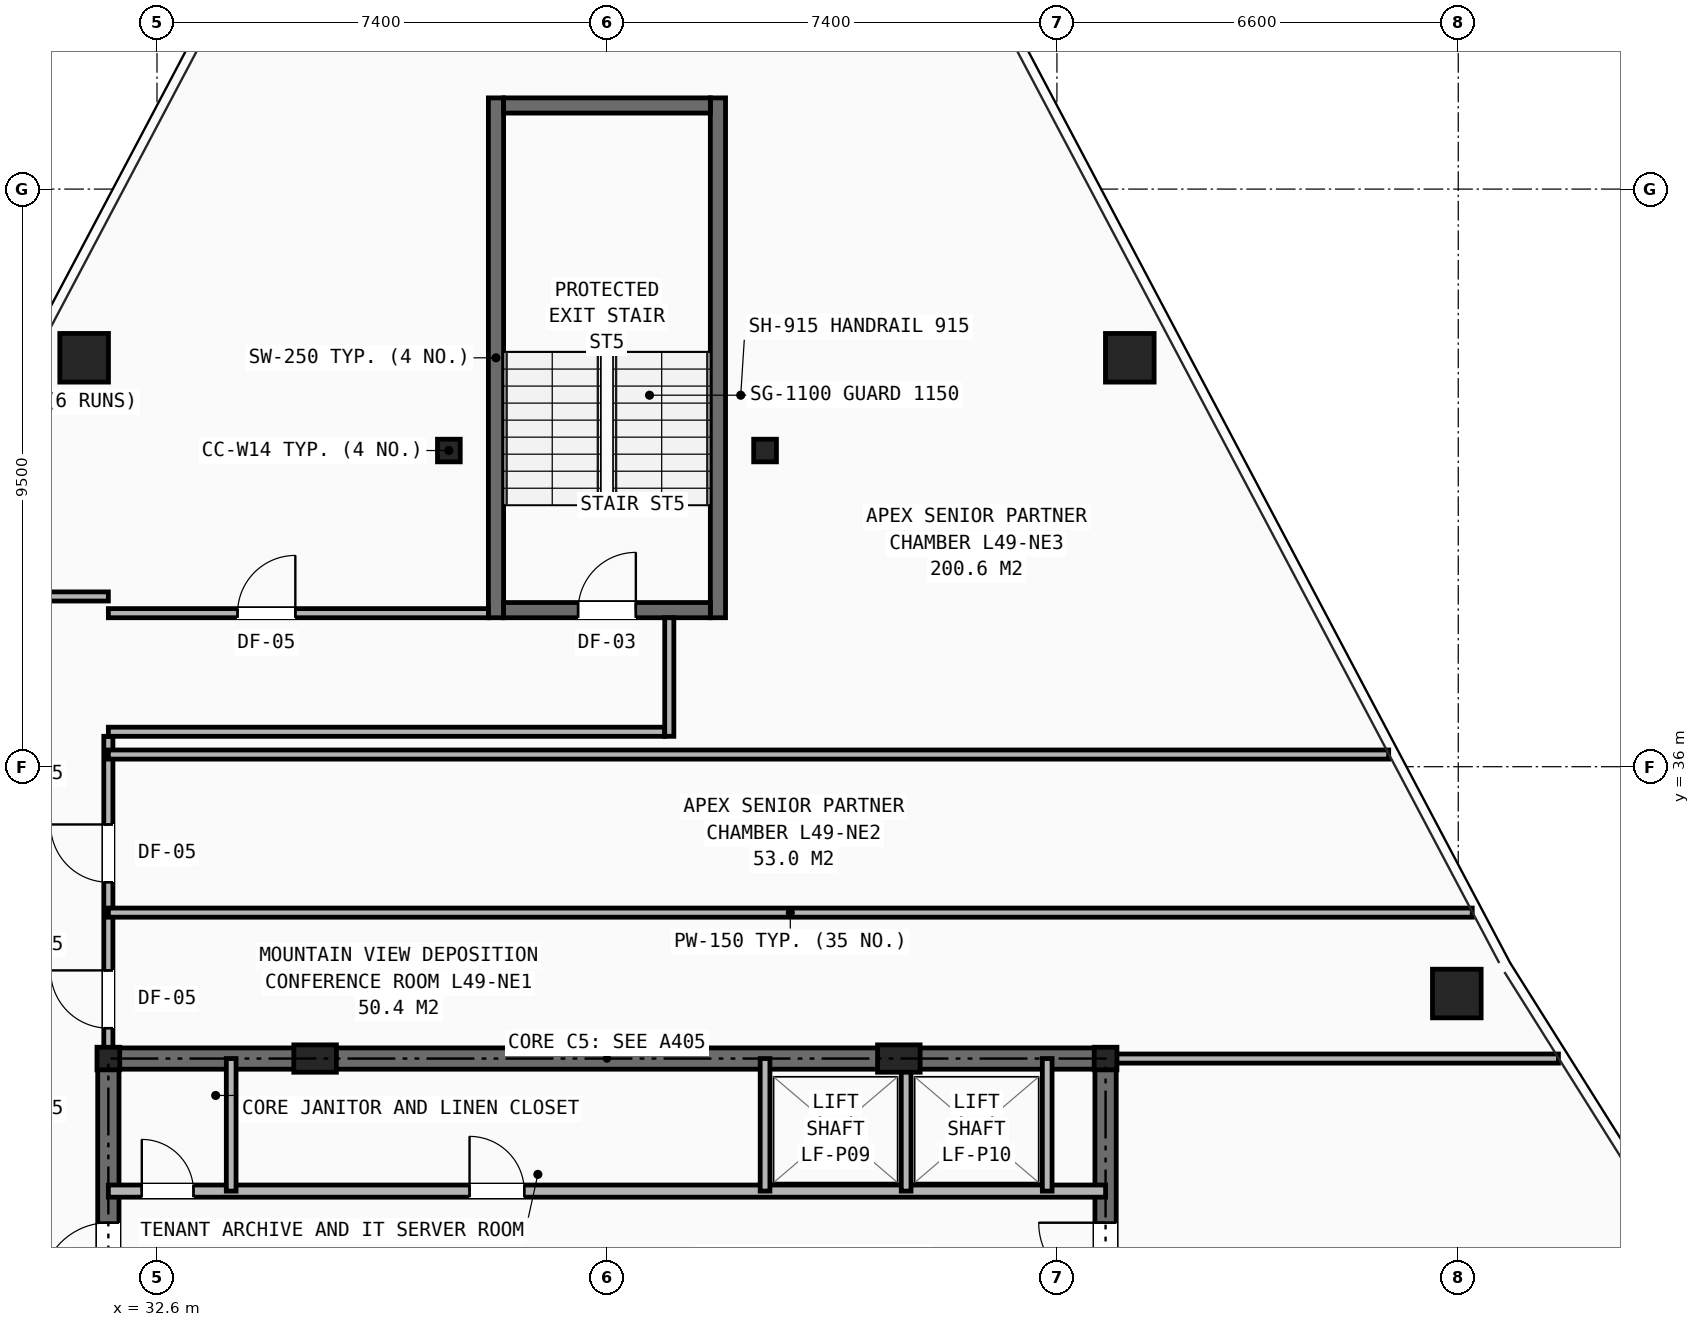
"""IFC4 building model, lengths in metres.
Left out: names, types, materials, properties, quantities, classifications, styles, units other than length and angle.
Written with IfcOpenShell. Run it as: python <this file> out.ifc"""

import sys

from ifc_helpers import new_model, si_unit, direction, frame, frame_2d, origin, origin_2d, place, context, subcontext, project, spatial, rectangle, hollow_rectangle, i_section, extrude, element, fill, save


model = new_model("IFC4")
c1 = context("Model", 3, precision=1e-05, world=origin(), true_north=direction((0.0, 1.0)))
c2 = subcontext(c1, "Body", "Model", "MODEL_VIEW")
j1 = project(units=[si_unit("LENGTHUNIT", "METRE"), si_unit("PLANEANGLEUNIT", "RADIAN")], contexts=[c1])
p1 = place(None, origin())
s1 = spatial("IfcSite", under=j1, at=p1, CompositionType="ELEMENT")
p2 = place(p1, origin())
s2 = spatial("IfcBuilding", under=s1, at=p2, CompositionType="ELEMENT")
p3 = place(p2, frame((0.0, 0.0, 172.35)))
s3 = spatial("IfcBuildingStorey", under=s2, at=p3, CompositionType="ELEMENT", Elevation=172.35)
for number, where, z_axis, x_axis in (
    (1, (31.8, 31.2, 0.0), (0.0, 0.0, 1.0), (1.0, 0.0, 0.0)),
    (2, (48.2, 31.2, 0.0), (0.0, 0.0, 1.0), (1.0, 0.0, 0.0)),
    (3, (37.4, 41.2, 0.0), (0.0, 0.0, 1.0), (1.0, 0.0, 0.0)),
    (4, (42.6, 41.2, 0.0), (0.0, 0.0, 1.0), (1.0, 0.0, 0.0)),
):
    element("IfcColumn", number, at=place(p3, frame(where, z_axis=z_axis, x_axis=x_axis)), inside=s3, PredefinedType="COLUMN", context=c2, shape_type="SweptSolid", body=[
        extrude(i_section(OverallWidth=0.374, OverallDepth=0.372, WebThickness=0.016, FlangeThickness=0.026, at=origin_2d()), origin(), (0.0, 0.0, 1.0), 3.45),
    ])
for number, where, z_axis, x_axis in (
    (5, (35.2, 31.2, 0.0), (0.0, 0.0, 1.0), (1.0, 0.0, 0.0)),
    (6, (44.8, 31.2, 0.0), (0.0, 0.0, 1.0), (1.0, 0.0, 0.0)),
):
    element("IfcColumn", number, at=place(p3, frame(where, z_axis=z_axis, x_axis=x_axis)), inside=s3, PredefinedType="PILASTER", context=c2, shape_type="SweptSolid", body=[
        extrude(rectangle(XDim=0.7, YDim=0.45, at=origin_2d()), origin(), (0.0, 0.0, 1.0), 3.45),
    ])
for number, where, z_axis, x_axis in (
    (7, (31.402, 42.726, 0.0), (0.0, 0.0, 1.0), (1.0, 0.0, 0.0)),
    (8, (53.976, 32.269, 0.0), (0.0, 0.0, 1.0), (1.0, 0.0, 0.0)),
    (9, (48.598, 42.726, 0.0), (0.0, 0.0, 1.0), (1.0, 0.0, 0.0)),
):
    element("IfcColumn", number, at=place(p3, frame(where, z_axis=z_axis, x_axis=x_axis)), inside=s3, PredefinedType="COLUMN", context=c2, shape_type="SweptSolid", body=[
        extrude(hollow_rectangle(XDim=0.8, YDim=0.8, WallThickness=0.055, at=origin_2d()), origin(), (0.0, 0.0, 1.0), 3.45),
    ])
p4 = place(p3, frame((31.8, 31.2, 0.0), z_axis=(0.0, 0.0, 1.0), x_axis=(1.0, 0.0, 0.0)))
e10 = element("IfcWall", 10, at=p4, inside=s3, PredefinedType="SHEAR", context=c2, shape_type="SweptSolid", body=[
    extrude(rectangle(XDim=16.4, YDim=0.35, at=frame_2d((8.2, 0.0))), origin(), (0.0, 0.0, 1.0), 3.21),
])
p5 = place(p3, frame((31.8, 16.4, 0.0), z_axis=(0.0, 0.0, 1.0), x_axis=(0.0, 1.0, 0.0)))
e11 = element("IfcWall", 11, at=p5, inside=s3, PredefinedType="SHEAR", context=c2, shape_type="SweptSolid", body=[
    extrude(rectangle(XDim=14.8, YDim=0.35, at=frame_2d((7.4, 0.0))), origin(), (0.0, 0.0, 1.0), 3.21),
])
p6 = place(p5, frame((11.0, 0.0, 0.0)))
e12 = element("IfcOpeningElement", 12, at=p6, cuts=e11, PredefinedType="OPENING", context=c2, shape_type="SweptSolid", body=[
    extrude(rectangle(XDim=1.1, YDim=2.15, at=frame_2d((0.55, 1.075))), frame((0.0, 0.185, 0.0), z_axis=(0.0, -1.0, 0.0), x_axis=(1.0, 0.0, 0.0)), (0.0, 0.0, 1.0), 0.37),
])
p7 = place(p3, frame((48.2, 16.4, 0.0), z_axis=(0.0, 0.0, 1.0), x_axis=(0.0, 1.0, 0.0)))
e13 = element("IfcWall", 13, at=p7, inside=s3, PredefinedType="SHEAR", context=c2, shape_type="SweptSolid", body=[
    extrude(rectangle(XDim=14.8, YDim=0.35, at=frame_2d((7.4, 0.0))), origin(), (0.0, 0.0, 1.0), 3.21),
])
p8 = place(p7, frame((11.0, 0.0, 0.0)))
e14 = element("IfcOpeningElement", 14, at=p8, cuts=e13, PredefinedType="OPENING", context=c2, shape_type="SweptSolid", body=[
    extrude(rectangle(XDim=1.1, YDim=2.15, at=frame_2d((0.55, 1.075))), frame((0.0, 0.185, 0.0), z_axis=(0.0, -1.0, 0.0), x_axis=(1.0, 0.0, 0.0)), (0.0, 0.0, 1.0), 0.37),
])
p9 = place(p3, frame((31.8, 29.02, 0.0), z_axis=(0.0, 0.0, 1.0), x_axis=(1.0, 0.0, 0.0)))
e15 = element("IfcWall", 15, at=p9, inside=s3, PredefinedType="SOLIDWALL", context=c2, shape_type="SweptSolid", body=[
    extrude(rectangle(XDim=16.4, YDim=0.2, at=frame_2d((8.2, 0.0))), origin(), (0.0, 0.0, 1.0), 2.665),
])
p10 = place(p9, frame((0.55, 0.0, 0.0)))
e16 = element("IfcOpeningElement", 16, at=p10, cuts=e15, PredefinedType="OPENING", context=c2, shape_type="SweptSolid", body=[
    extrude(rectangle(XDim=0.85, YDim=2.05, at=frame_2d((0.425, 1.025))), frame((0.0, 0.11, 0.0), z_axis=(0.0, -1.0, 0.0), x_axis=(1.0, 0.0, 0.0)), (0.0, 0.0, 1.0), 0.22),
])
p11 = place(p9, frame((5.94, 0.0, 0.0)))
e17 = element("IfcOpeningElement", 17, at=p11, cuts=e15, PredefinedType="OPENING", context=c2, shape_type="SweptSolid", body=[
    extrude(rectangle(XDim=0.9, YDim=2.1, at=frame_2d((0.45, 1.05))), frame((0.0, 0.11, 0.0), z_axis=(0.0, -1.0, 0.0), x_axis=(1.0, 0.0, 0.0)), (0.0, 0.0, 1.0), 0.22),
])
for number, where, z_axis, x_axis in (
    (18, (33.82, 29.02, 0.0), (0.0, 0.0, 1.0), (0.0, 1.0, 0.0)),
    (19, (42.6, 29.02, 0.0), (0.0, 0.0, 1.0), (0.0, 1.0, 0.0)),
    (20, (44.92, 29.02, 0.0), (0.0, 0.0, 1.0), (0.0, 1.0, 0.0)),
    (21, (47.24, 29.02, 0.0), (0.0, 0.0, 1.0), (0.0, 1.0, 0.0)),
):
    element("IfcWall", number, at=place(p3, frame(where, z_axis=z_axis, x_axis=x_axis)), inside=s3, PredefinedType="SOLIDWALL", context=c2, shape_type="SweptSolid", body=[
        extrude(rectangle(XDim=2.18, YDim=0.16, at=frame_2d((1.09, 0.0))), origin(), (0.0, 0.0, 1.0), 2.665),
    ])
p12 = place(p3, frame((31.8, 31.2, 0.0), z_axis=(0.0, 0.0, 1.0), x_axis=(0.0, 1.0, 0.0)))
e22 = element("IfcWall", 22, at=p12, inside=s3, PredefinedType="PARTITIONING", context=c2, shape_type="SweptSolid", body=[
    extrude(rectangle(XDim=5.3, YDim=0.15, at=frame_2d((2.65, 0.0))), origin(), (0.0, 0.0, 1.0), 2.252),
])
p13 = place(p12, frame((0.5, 0.0, 0.0)))
e23 = element("IfcOpeningElement", 23, at=p13, cuts=e22, PredefinedType="OPENING", context=c2, shape_type="SweptSolid", body=[
    extrude(rectangle(XDim=0.95, YDim=2.1, at=frame_2d((0.475, 1.05))), frame((0.0, 0.085, 0.0), z_axis=(0.0, -1.0, 0.0), x_axis=(1.0, 0.0, 0.0)), (0.0, 0.0, 1.0), 0.17),
])
p14 = place(p12, frame((2.9, 0.0, 0.0)))
e24 = element("IfcOpeningElement", 24, at=p14, cuts=e22, PredefinedType="OPENING", context=c2, shape_type="SweptSolid", body=[
    extrude(rectangle(XDim=0.95, YDim=2.1, at=frame_2d((0.475, 1.05))), frame((0.0, 0.085, 0.0), z_axis=(0.0, -1.0, 0.0), x_axis=(1.0, 0.0, 0.0)), (0.0, 0.0, 1.0), 0.17),
])
p15 = place(p3, frame((29.6, 38.8, 0.0), z_axis=(0.0, 0.0, 1.0), x_axis=(1.0, 0.0, 0.0)))
e25 = element("IfcWall", 25, at=p15, inside=s3, PredefinedType="PARTITIONING", context=c2, shape_type="SweptSolid", body=[
    extrude(rectangle(XDim=2.2, YDim=0.15, at=frame_2d((1.1, 0.0))), origin(), (0.0, 0.0, 1.0), 2.589),
])
p16 = place(p3, frame((48.2, 31.2, 0.0), z_axis=(0.0, 0.0, 1.0), x_axis=(1.0, 0.0, 0.0)))
e26 = element("IfcWall", 26, at=p16, inside=s3, PredefinedType="PARTITIONING", context=c2, shape_type="SweptSolid", body=[
    extrude(rectangle(XDim=7.448, YDim=0.15, at=frame_2d((3.724, 0.0))), origin(), (0.0, 0.0, 1.0), 2.252),
])
p17 = place(p3, frame((31.8, 33.6, 0.0), z_axis=(0.0, 0.0, 1.0), x_axis=(1.0, 0.0, 0.0)))
e27 = element("IfcWall", 27, at=p17, inside=s3, PredefinedType="PARTITIONING", context=c2, shape_type="SweptSolid", body=[
    extrude(rectangle(XDim=22.43, YDim=0.15, at=frame_2d((11.215, 0.0))), origin(), (0.0, 0.0, 1.0), 2.589),
])
p18 = place(p3, frame((31.8, 36.2, 0.0), z_axis=(0.0, 0.0, 1.0), x_axis=(1.0, 0.0, 0.0)))
e28 = element("IfcWall", 28, at=p18, inside=s3, PredefinedType="PARTITIONING", context=c2, shape_type="SweptSolid", body=[
    extrude(rectangle(XDim=21.056, YDim=0.15, at=frame_2d((10.528, 0.0))), origin(), (0.0, 0.0, 1.0), 2.589),
])
for number, where, z_axis, x_axis in (
    (29, (38.175, 38.45, 0.0), (0.0, 0.0, 1.0), (0.0, 1.0, 0.0)),
    (30, (41.825, 38.45, 0.0), (0.0, 0.0, 1.0), (0.0, 1.0, 0.0)),
):
    element("IfcWall", number, at=place(p3, frame(where, z_axis=z_axis, x_axis=x_axis)), inside=s3, PredefinedType="SHEAR", context=c2, shape_type="SweptSolid", body=[
        extrude(rectangle(XDim=8.55, YDim=0.25, at=frame_2d((4.275, 0.0))), origin(), (0.0, 0.0, 1.0), 3.21),
    ])
p19 = place(p3, frame((38.3, 38.575, 0.0), z_axis=(0.0, 0.0, 1.0), x_axis=(1.0, 0.0, 0.0)))
e31 = element("IfcWall", 31, at=p19, inside=s3, PredefinedType="SHEAR", context=c2, shape_type="SweptSolid", body=[
    extrude(rectangle(XDim=3.4, YDim=0.25, at=frame_2d((1.7, 0.0))), origin(), (0.0, 0.0, 1.0), 3.21),
])
p20 = place(p19, frame((1.225, 0.0, 0.0)))
e32 = element("IfcOpeningElement", 32, at=p20, cuts=e31, PredefinedType="OPENING", context=c2, shape_type="SweptSolid", body=[
    extrude(rectangle(XDim=0.95, YDim=2.1, at=frame_2d((0.475, 1.05))), frame((0.0, 0.135, 0.0), z_axis=(0.0, -1.0, 0.0), x_axis=(1.0, 0.0, 0.0)), (0.0, 0.0, 1.0), 0.27),
])
p21 = place(p3, frame((38.3, 46.875, 0.0), z_axis=(0.0, 0.0, 1.0), x_axis=(1.0, 0.0, 0.0)))
e33 = element("IfcWall", 33, at=p21, inside=s3, PredefinedType="SHEAR", context=c2, shape_type="SweptSolid", body=[
    extrude(rectangle(XDim=3.4, YDim=0.25, at=frame_2d((1.7, 0.0))), origin(), (0.0, 0.0, 1.0), 3.21),
])
p22 = place(p3, frame((31.8, 36.575, 0.0), z_axis=(0.0, 0.0, 1.0), x_axis=(1.0, 0.0, 0.0)))
e34 = element("IfcWall", 34, at=p22, inside=s3, PredefinedType="PARTITIONING", context=c2, shape_type="SweptSolid", body=[
    extrude(rectangle(XDim=9.15, YDim=0.15, at=frame_2d((4.575, 0.0))), origin(), (0.0, 0.0, 1.0), 3.21),
])
p23 = place(p3, frame((31.8, 38.525, 0.0), z_axis=(0.0, 0.0, 1.0), x_axis=(1.0, 0.0, 0.0)))
e35 = element("IfcWall", 35, at=p23, inside=s3, PredefinedType="PARTITIONING", context=c2, shape_type="SweptSolid", body=[
    extrude(rectangle(XDim=6.25, YDim=0.15, at=frame_2d((3.125, 0.0))), origin(), (0.0, 0.0, 1.0), 2.793),
])
p24 = place(p23, frame((2.125, 0.0, 0.0)))
e36 = element("IfcOpeningElement", 36, at=p24, cuts=e35, PredefinedType="OPENING", context=c2, shape_type="SweptSolid", body=[
    extrude(rectangle(XDim=0.95, YDim=2.1, at=frame_2d((0.475, 1.05))), frame((0.0, 0.085, 0.0), z_axis=(0.0, -1.0, 0.0), x_axis=(1.0, 0.0, 0.0)), (0.0, 0.0, 1.0), 0.17),
])
p25 = place(p3, frame((41.025, 36.5, 0.0), z_axis=(0.0, 0.0, 1.0), x_axis=(0.0, 1.0, 0.0)))
e37 = element("IfcWall", 37, at=p25, inside=s3, PredefinedType="PARTITIONING", context=c2, shape_type="SweptSolid", body=[
    extrude(rectangle(XDim=1.95, YDim=0.15, at=frame_2d((0.975, 0.0))), origin(), (0.0, 0.0, 1.0), 3.21),
])
p26 = place(p10, origin())
e38 = element("IfcDoor", 38, at=p26, inside=s3, OperationType="SINGLE_SWING_LEFT", PredefinedType="DOOR", context=c2, shape_type="SweptSolid", body=[
    extrude(rectangle(XDim=0.85, YDim=2.05, at=frame_2d((0.425, 1.025))), frame((0.0, 0.025, 0.0), z_axis=(0.0, -1.0, 0.0), x_axis=(1.0, 0.0, 0.0)), (0.0, 0.0, 1.0), 0.05),
])
fill(e16, e38)
p27 = place(p6, origin())
e39 = element("IfcDoor", 39, at=p27, inside=s3, OperationType="SINGLE_SWING_LEFT", PredefinedType="DOOR", context=c2, shape_type="SweptSolid", body=[
    extrude(rectangle(XDim=1.1, YDim=2.15, at=frame_2d((0.55, 1.075))), frame((0.0, 0.025, 0.0), z_axis=(0.0, -1.0, 0.0), x_axis=(1.0, 0.0, 0.0)), (0.0, 0.0, 1.0), 0.05),
])
fill(e12, e39)
p28 = place(p8, origin())
e40 = element("IfcDoor", 40, at=p28, inside=s3, OperationType="SINGLE_SWING_RIGHT", PredefinedType="DOOR", context=c2, shape_type="SweptSolid", body=[
    extrude(rectangle(XDim=1.1, YDim=2.15, at=frame_2d((0.55, 1.075))), frame((0.0, 0.025, 0.0), z_axis=(0.0, -1.0, 0.0), x_axis=(1.0, 0.0, 0.0)), (0.0, 0.0, 1.0), 0.05),
])
fill(e14, e40)
p29 = place(p11, origin())
e41 = element("IfcDoor", 41, at=p29, inside=s3, OperationType="SINGLE_SWING_LEFT", PredefinedType="DOOR", context=c2, shape_type="SweptSolid", body=[
    extrude(rectangle(XDim=0.9, YDim=2.1, at=frame_2d((0.45, 1.05))), frame((0.0, 0.025, 0.0), z_axis=(0.0, -1.0, 0.0), x_axis=(1.0, 0.0, 0.0)), (0.0, 0.0, 1.0), 0.05),
])
fill(e17, e41)
p30 = place(p13, origin())
e42 = element("IfcDoor", 42, at=p30, inside=s3, OperationType="SINGLE_SWING_RIGHT", PredefinedType="DOOR", context=c2, shape_type="SweptSolid", body=[
    extrude(rectangle(XDim=0.95, YDim=2.1, at=frame_2d((0.475, 1.05))), frame((0.0, 0.025, 0.0), z_axis=(0.0, -1.0, 0.0), x_axis=(1.0, 0.0, 0.0)), (0.0, 0.0, 1.0), 0.05),
])
fill(e23, e42)
p31 = place(p14, origin())
e43 = element("IfcDoor", 43, at=p31, inside=s3, OperationType="SINGLE_SWING_RIGHT", PredefinedType="DOOR", context=c2, shape_type="SweptSolid", body=[
    extrude(rectangle(XDim=0.95, YDim=2.1, at=frame_2d((0.475, 1.05))), frame((0.0, 0.025, 0.0), z_axis=(0.0, -1.0, 0.0), x_axis=(1.0, 0.0, 0.0)), (0.0, 0.0, 1.0), 0.05),
])
fill(e24, e43)
p32 = place(p24, origin())
e44 = element("IfcDoor", 44, at=p32, inside=s3, OperationType="SINGLE_SWING_RIGHT", PredefinedType="DOOR", context=c2, shape_type="SweptSolid", body=[
    extrude(rectangle(XDim=0.95, YDim=2.1, at=frame_2d((0.475, 1.05))), frame((0.0, 0.025, 0.0), z_axis=(0.0, -1.0, 0.0), x_axis=(1.0, 0.0, 0.0)), (0.0, 0.0, 1.0), 0.05),
])
fill(e36, e44)
p33 = place(p20, origin())
e45 = element("IfcDoor", 45, at=p33, inside=s3, OperationType="SINGLE_SWING_RIGHT", PredefinedType="DOOR", context=c2, shape_type="SweptSolid", body=[
    extrude(rectangle(XDim=0.95, YDim=2.1, at=frame_2d((0.475, 1.05))), frame((0.0, 0.025, 0.0), z_axis=(0.0, -1.0, 0.0), x_axis=(1.0, 0.0, 0.0)), (0.0, 0.0, 1.0), 0.05),
])
fill(e32, e45)
save(model, sys.argv[1])
